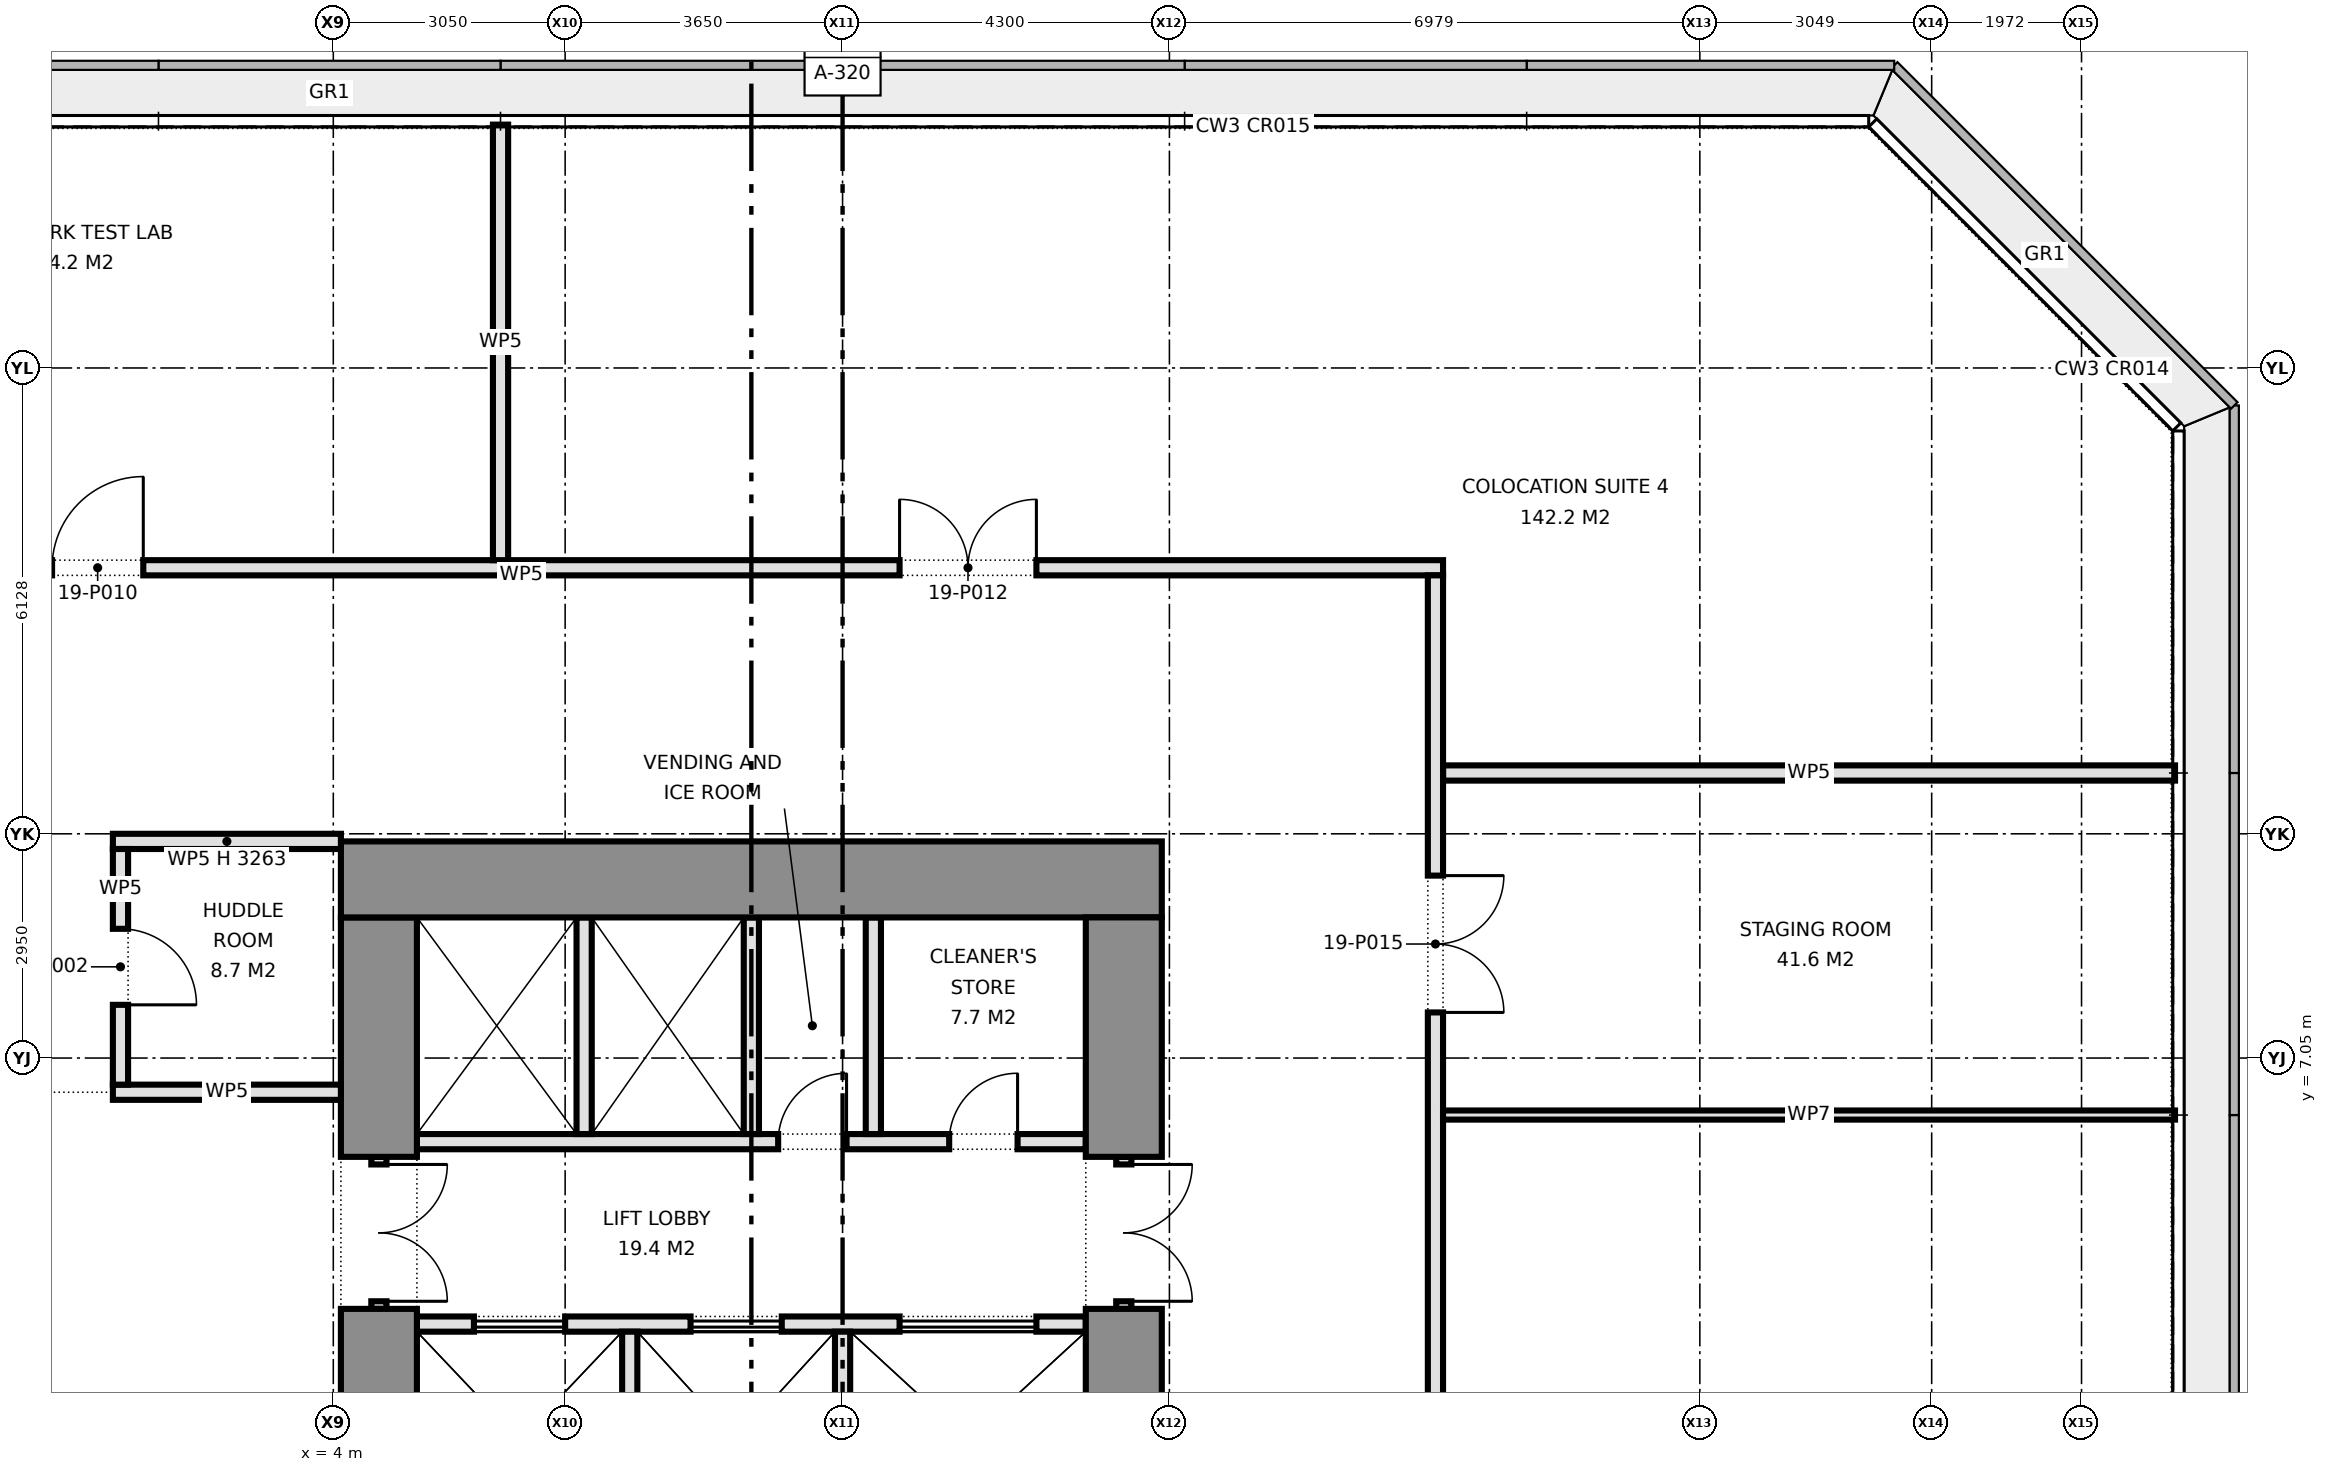
"""IFC4 building model, lengths in metres.
Left out: names, types, materials, properties, quantities, classifications, styles, units other than length and angle.
Written with IfcOpenShell. Run it as: python <this file> out.ifc"""

import sys

from ifc_helpers import new_model, si_unit, direction, frame, frame_2d, origin, place, context, subcontext, project, spatial, rectangle, extrude, element, fill, save


model = new_model("IFC4")
c1 = context("Model", 3, precision=1e-05, world=origin(), true_north=direction((0.0, 1.0)))
c2 = subcontext(c1, "Body", "Model", "MODEL_VIEW")
j1 = project(units=[si_unit("LENGTHUNIT", "METRE"), si_unit("PLANEANGLEUNIT", "RADIAN")], contexts=[c1])
p1 = place(None, origin())
s1 = spatial("IfcSite", under=j1, at=p1, CompositionType="ELEMENT")
p2 = place(p1, origin())
s2 = spatial("IfcBuilding", under=s1, at=p2, CompositionType="ELEMENT")
p3 = place(p2, frame((0.0, 0.0, 86.4)))
s3 = spatial("IfcBuildingStorey", under=s2, at=p3, CompositionType="ELEMENT", Elevation=86.4)
p4 = place(p3, frame((14.9, 9.4, 0.0), z_axis=(0.0, 0.0, 1.0), x_axis=(-1.0, 0.0, 0.0)))
e1 = element("IfcWall", 1, at=p4, inside=s3, PredefinedType="SHEAR", context=c2, shape_type="SweptSolid", body=[
    extrude(rectangle(XDim=10.8, YDim=1.0, at=frame_2d((5.4, 0.0))), origin(), (0.0, 0.0, 1.0), 4.2),
])
p5 = place(p3, frame((14.4, 8.9, 0.0), z_axis=(0.0, 0.0, 1.0), x_axis=(0.0, -1.0, 0.0)))
e2 = element("IfcWall", 2, at=p5, inside=s3, PredefinedType="SHEAR", context=c2, shape_type="SweptSolid", body=[
    extrude(rectangle(XDim=3.15, YDim=1.0, at=frame_2d((1.575, 0.0))), origin(), (0.0, 0.0, 1.0), 4.2),
])
p6 = place(p3, frame((14.4, 5.75, 0.0), z_axis=(0.0, 0.0, 1.0), x_axis=(0.0, -1.0, 0.0)))
e3 = element("IfcWall", 3, at=p6, inside=s3, PredefinedType="PARTITIONING", context=c2, shape_type="SweptSolid", body=[
    extrude(rectangle(XDim=2.0, YDim=0.2, at=frame_2d((1.0, 0.0))), origin(), (0.0, 0.0, 1.0), 2.4),
])
p7 = place(p6, frame((0.1, 0.0, 0.0)))
e4 = element("IfcOpeningElement", 4, at=p7, cuts=e3, PredefinedType="OPENING", context=c2, shape_type="SweptSolid", body=[
    extrude(rectangle(XDim=1.8, YDim=2.1, at=frame_2d((0.9, 1.05))), frame((0.0, 0.11, 0.0), z_axis=(0.0, -1.0, 0.0), x_axis=(1.0, 0.0, 0.0)), (0.0, 0.0, 1.0), 0.22),
])
p8 = place(p3, frame((14.4, 3.75, 0.0), z_axis=(0.0, 0.0, 1.0), x_axis=(0.0, -1.0, 0.0)))
e5 = element("IfcWall", 5, at=p8, inside=s3, PredefinedType="SHEAR", context=c2, shape_type="SweptSolid", body=[
    extrude(rectangle(XDim=6.13, YDim=1.0, at=frame_2d((3.065, 0.0))), origin(), (0.0, 0.0, 1.0), 4.2),
])
p9 = place(p3, frame((4.6, 8.9, 0.0), z_axis=(0.0, 0.0, 1.0), x_axis=(0.0, -1.0, 0.0)))
e6 = element("IfcWall", 6, at=p9, inside=s3, PredefinedType="SHEAR", context=c2, shape_type="SweptSolid", body=[
    extrude(rectangle(XDim=3.15, YDim=1.0, at=frame_2d((1.575, 0.0))), origin(), (0.0, 0.0, 1.0), 4.2),
])
p10 = place(p3, frame((4.6, 5.75, 0.0), z_axis=(0.0, 0.0, 1.0), x_axis=(0.0, -1.0, 0.0)))
e7 = element("IfcWall", 7, at=p10, inside=s3, PredefinedType="PARTITIONING", context=c2, shape_type="SweptSolid", body=[
    extrude(rectangle(XDim=2.0, YDim=0.2, at=frame_2d((1.0, 0.0))), origin(), (0.0, 0.0, 1.0), 2.4),
])
p11 = place(p10, frame((0.1, 0.0, 0.0)))
e8 = element("IfcOpeningElement", 8, at=p11, cuts=e7, PredefinedType="OPENING", context=c2, shape_type="SweptSolid", body=[
    extrude(rectangle(XDim=1.8, YDim=2.1, at=frame_2d((0.9, 1.05))), frame((0.0, 0.11, 0.0), z_axis=(0.0, -1.0, 0.0), x_axis=(1.0, 0.0, 0.0)), (0.0, 0.0, 1.0), 0.22),
])
p12 = place(p3, frame((4.6, 3.75, 0.0), z_axis=(0.0, 0.0, 1.0), x_axis=(0.0, -1.0, 0.0)))
e9 = element("IfcWall", 9, at=p12, inside=s3, PredefinedType="SHEAR", context=c2, shape_type="SweptSolid", body=[
    extrude(rectangle(XDim=4.0, YDim=1.0, at=frame_2d((2.0, 0.0))), origin(), (0.0, 0.0, 1.0), 4.2),
])
p13 = place(p3, frame((13.9, 5.95, 0.0), z_axis=(0.0, 0.0, 1.0), x_axis=(-1.0, 0.0, 0.0)))
e10 = element("IfcWall", 10, at=p13, inside=s3, PredefinedType="PARTITIONING", context=c2, shape_type="SweptSolid", body=[
    extrude(rectangle(XDim=8.8, YDim=0.2, at=frame_2d((4.4, 0.0))), origin(), (0.0, 0.0, 1.0), 4.2),
])
p14 = place(p13, frame((0.897, 0.0, 0.0)))
e11 = element("IfcOpeningElement", 11, at=p14, cuts=e10, PredefinedType="OPENING", context=c2, shape_type="SweptSolid", body=[
    extrude(rectangle(XDim=0.9, YDim=2.1, at=frame_2d((0.45, 1.05))), frame((0.0, 0.11, 0.0), z_axis=(0.0, -1.0, 0.0), x_axis=(1.0, 0.0, 0.0)), (0.0, 0.0, 1.0), 0.22),
])
p15 = place(p13, frame((3.147, 0.0, 0.0)))
e12 = element("IfcOpeningElement", 12, at=p15, cuts=e10, PredefinedType="OPENING", context=c2, shape_type="SweptSolid", body=[
    extrude(rectangle(XDim=0.9, YDim=2.1, at=frame_2d((0.45, 1.05))), frame((0.0, 0.11, 0.0), z_axis=(0.0, -1.0, 0.0), x_axis=(1.0, 0.0, 0.0)), (0.0, 0.0, 1.0), 0.22),
])
p16 = place(p3, frame((13.9, 3.55, 0.0), z_axis=(0.0, 0.0, 1.0), x_axis=(-1.0, 0.0, 0.0)))
e13 = element("IfcWall", 13, at=p16, inside=s3, PredefinedType="PARTITIONING", context=c2, shape_type="SweptSolid", body=[
    extrude(rectangle(XDim=8.8, YDim=0.2, at=frame_2d((4.4, 0.0))), origin(), (0.0, 0.0, 1.0), 4.2),
])
p17 = place(p16, frame((0.65, 0.0, 0.0)))
e14 = element("IfcOpeningElement", 14, at=p17, cuts=e13, PredefinedType="OPENING", context=c2, shape_type="SweptSolid", body=[
    extrude(rectangle(XDim=1.8, YDim=2.1, at=frame_2d((0.9, 1.05))), frame((0.0, 0.11, 0.0), z_axis=(0.0, -1.0, 0.0), x_axis=(1.0, 0.0, 0.0)), (0.0, 0.0, 1.0), 0.22),
])
p18 = place(p16, frame((4.0, 0.0, 0.0)))
e15 = element("IfcOpeningElement", 15, at=p18, cuts=e13, PredefinedType="OPENING", context=c2, shape_type="SweptSolid", body=[
    extrude(rectangle(XDim=1.2, YDim=2.1, at=frame_2d((0.6, 1.05))), frame((0.0, 0.11, 0.0), z_axis=(0.0, -1.0, 0.0), x_axis=(1.0, 0.0, 0.0)), (0.0, 0.0, 1.0), 0.22),
])
p19 = place(p16, frame((6.85, 0.0, 0.0)))
e16 = element("IfcOpeningElement", 16, at=p19, cuts=e13, PredefinedType="OPENING", context=c2, shape_type="SweptSolid", body=[
    extrude(rectangle(XDim=1.2, YDim=2.1, at=frame_2d((0.6, 1.05))), frame((0.0, 0.11, 0.0), z_axis=(0.0, -1.0, 0.0), x_axis=(1.0, 0.0, 0.0)), (0.0, 0.0, 1.0), 0.22),
])
for number, where, z_axis, x_axis in (
    (17, (9.5, 8.9, 0.0), (0.0, 0.0, 1.0), (0.0, -1.0, 0.0)),
    (18, (7.3, 8.9, 0.0), (0.0, 0.0, 1.0), (0.0, -1.0, 0.0)),
    (19, (11.105, 8.9, 0.0), (0.0, 0.0, 1.0), (0.0, -1.0, 0.0)),
    (20, (10.7, 3.45, 0.0), (0.0, 0.0, 1.0), (0.0, -1.0, 0.0)),
    (21, (7.9, 3.45, 0.0), (0.0, 0.0, 1.0), (0.0, -1.0, 0.0)),
):
    element("IfcWall", number, at=place(p3, frame(where, z_axis=z_axis, x_axis=x_axis)), inside=s3, PredefinedType="PARTITIONING", context=c2, shape_type="SweptSolid", body=[
        extrude(rectangle(XDim=2.85, YDim=0.2, at=frame_2d((1.425, 0.0))), origin(), (0.0, 0.0, 1.0), 4.2),
    ])
p20 = place(p3, frame((1.1, 6.6, 0.0), z_axis=(0.0, 0.0, 1.0), x_axis=(1.0, 0.0, 0.0)))
e22 = element("IfcWall", 22, at=p20, inside=s3, PredefinedType="PARTITIONING", context=c2, shape_type="SweptSolid", body=[
    extrude(rectangle(XDim=3.0, YDim=0.2, at=frame_2d((1.5, 0.0))), origin(), (0.0, 0.0, 1.0), 4.2),
])
p21 = place(p3, frame((1.1, 9.9, 0.0), z_axis=(0.0, 0.0, 1.0), x_axis=(1.0, 0.0, 0.0)))
e23 = element("IfcWall", 23, at=p21, inside=s3, PredefinedType="PARTITIONING", context=c2, shape_type="SweptSolid", body=[
    extrude(rectangle(XDim=3.0, YDim=0.2, at=frame_2d((1.5, 0.0))), origin(), (0.0, 0.0, 1.0), 3.263),
])
p22 = place(p3, frame((18.6, 10.8, 0.0), z_axis=(0.0, 0.0, 1.0), x_axis=(1.0, 0.0, 0.0)))
e24 = element("IfcWall", 24, at=p22, inside=s3, PredefinedType="PARTITIONING", context=c2, shape_type="SweptSolid", body=[
    extrude(rectangle(XDim=9.63, YDim=0.2, at=frame_2d((4.815, 0.0))), origin(), (0.0, 0.0, 1.0), 4.2),
])
p23 = place(p3, frame((-18.6, 13.5, 0.0), z_axis=(0.0, 0.0, 1.0), x_axis=(1.0, 0.0, 0.0)))
e25 = element("IfcWall", 25, at=p23, inside=s3, PredefinedType="PARTITIONING", context=c2, shape_type="SweptSolid", body=[
    extrude(rectangle(XDim=37.2, YDim=0.2, at=frame_2d((18.6, 0.0))), origin(), (0.0, 0.0, 1.0), 4.2),
])
p24 = place(p23, frame((5.1, 0.0, 0.0)))
e26 = element("IfcOpeningElement", 26, at=p24, cuts=e25, PredefinedType="OPENING", context=c2, shape_type="SweptSolid", body=[
    extrude(rectangle(XDim=1.2, YDim=2.1, at=frame_2d((0.6, 1.05))), frame((0.0, 0.11, 0.0), z_axis=(0.0, -1.0, 0.0), x_axis=(1.0, 0.0, 0.0)), (0.0, 0.0, 1.0), 0.22),
])
p25 = place(p23, frame((18.9, 0.0, 0.0)))
e27 = element("IfcOpeningElement", 27, at=p25, cuts=e25, PredefinedType="OPENING", context=c2, shape_type="SweptSolid", body=[
    extrude(rectangle(XDim=1.2, YDim=2.1, at=frame_2d((0.6, 1.05))), frame((0.0, 0.11, 0.0), z_axis=(0.0, -1.0, 0.0), x_axis=(1.0, 0.0, 0.0)), (0.0, 0.0, 1.0), 0.22),
])
p26 = place(p23, frame((12.15, 0.0, 0.0)))
e28 = element("IfcOpeningElement", 28, at=p26, cuts=e25, PredefinedType="OPENING", context=c2, shape_type="SweptSolid", body=[
    extrude(rectangle(XDim=1.2, YDim=2.1, at=frame_2d((0.6, 1.05))), frame((0.0, 0.11, 0.0), z_axis=(0.0, -1.0, 0.0), x_axis=(1.0, 0.0, 0.0)), (0.0, 0.0, 1.0), 0.22),
])
p27 = place(p23, frame((30.05, 0.0, 0.0)))
e29 = element("IfcOpeningElement", 29, at=p27, cuts=e25, PredefinedType="OPENING", context=c2, shape_type="SweptSolid", body=[
    extrude(rectangle(XDim=1.8, YDim=2.1, at=frame_2d((0.9, 1.05))), frame((0.0, 0.11, 0.0), z_axis=(0.0, -1.0, 0.0), x_axis=(1.0, 0.0, 0.0)), (0.0, 0.0, 1.0), 0.22),
])
p28 = place(p3, frame((18.5, -13.4, 0.0), z_axis=(0.0, 0.0, 1.0), x_axis=(0.0, 1.0, 0.0)))
e30 = element("IfcWall", 30, at=p28, inside=s3, PredefinedType="PARTITIONING", context=c2, shape_type="SweptSolid", body=[
    extrude(rectangle(XDim=26.8, YDim=0.2, at=frame_2d((13.4, 0.0))), origin(), (0.0, 0.0, 1.0), 4.2),
])
p29 = place(p28, frame((5.6, 0.0, 0.0)))
e31 = element("IfcOpeningElement", 31, at=p29, cuts=e30, PredefinedType="OPENING", context=c2, shape_type="SweptSolid", body=[
    extrude(rectangle(XDim=1.2, YDim=2.1, at=frame_2d((0.6, 1.05))), frame((0.0, 0.11, 0.0), z_axis=(0.0, -1.0, 0.0), x_axis=(1.0, 0.0, 0.0)), (0.0, 0.0, 1.0), 0.22),
])
p30 = place(p28, frame((14.6, 0.0, 0.0)))
e32 = element("IfcOpeningElement", 32, at=p30, cuts=e30, PredefinedType="OPENING", context=c2, shape_type="SweptSolid", body=[
    extrude(rectangle(XDim=1.2, YDim=2.1, at=frame_2d((0.6, 1.05))), frame((0.0, 0.11, 0.0), z_axis=(0.0, -1.0, 0.0), x_axis=(1.0, 0.0, 0.0)), (0.0, 0.0, 1.0), 0.22),
])
p31 = place(p28, frame((21.05, 0.0, 0.0)))
e33 = element("IfcOpeningElement", 33, at=p31, cuts=e30, PredefinedType="OPENING", context=c2, shape_type="SweptSolid", body=[
    extrude(rectangle(XDim=1.8, YDim=2.1, at=frame_2d((0.9, 1.05))), frame((0.0, 0.11, 0.0), z_axis=(0.0, -1.0, 0.0), x_axis=(1.0, 0.0, 0.0)), (0.0, 0.0, 1.0), 0.22),
])
p32 = place(p3, frame((6.2, 13.6, 0.0), z_axis=(0.0, 0.0, 1.0), x_axis=(0.0, 1.0, 0.0)))
e34 = element("IfcWall", 34, at=p32, inside=s3, PredefinedType="PARTITIONING", context=c2, shape_type="SweptSolid", body=[
    extrude(rectangle(XDim=5.73, YDim=0.2, at=frame_2d((2.865, 0.0))), origin(), (0.0, 0.0, 1.0), 4.2),
])
p33 = place(p3, frame((1.2, 6.7, 0.0), z_axis=(0.0, 0.0, 1.0), x_axis=(0.0, 1.0, 0.0)))
e35 = element("IfcWall", 35, at=p33, inside=s3, PredefinedType="PARTITIONING", context=c2, shape_type="SweptSolid", body=[
    extrude(rectangle(XDim=3.1, YDim=0.2, at=frame_2d((1.55, 0.0))), origin(), (0.0, 0.0, 1.0), 4.2),
])
p34 = place(p33, frame((1.05, 0.0, 0.0)))
e36 = element("IfcOpeningElement", 36, at=p34, cuts=e35, PredefinedType="OPENING", context=c2, shape_type="SweptSolid", body=[
    extrude(rectangle(XDim=1.0, YDim=2.1, at=frame_2d((0.5, 1.05))), frame((0.0, 0.11, 0.0), z_axis=(0.0, -1.0, 0.0), x_axis=(1.0, 0.0, 0.0)), (0.0, 0.0, 1.0), 0.22),
])
p35 = place(p3, frame((18.6, 6.3, 0.0), z_axis=(0.0, 0.0, 1.0), x_axis=(1.0, 0.0, 0.0)))
e37 = element("IfcWall", 37, at=p35, inside=s3, PredefinedType="PARTITIONING", context=c2, shape_type="SweptSolid", body=[
    extrude(rectangle(XDim=9.63, YDim=0.12, at=frame_2d((4.815, 0.0))), origin(), (0.0, 0.0, 1.0), 4.2),
])
p36 = place(p7, origin())
e38 = element("IfcDoor", 38, at=p36, inside=s3, OperationType="DOUBLE_DOOR_SINGLE_SWING", PredefinedType="DOOR", context=c2, shape_type="SweptSolid", body=[
    extrude(rectangle(XDim=1.8, YDim=2.1, at=frame_2d((0.9, 1.05))), frame((0.0, 0.025, 0.0), z_axis=(0.0, -1.0, 0.0), x_axis=(1.0, 0.0, 0.0)), (0.0, 0.0, 1.0), 0.05),
])
fill(e4, e38)
p37 = place(p11, origin())
e39 = element("IfcDoor", 39, at=p37, inside=s3, OperationType="DOUBLE_DOOR_SINGLE_SWING", PredefinedType="DOOR", context=c2, shape_type="SweptSolid", body=[
    extrude(rectangle(XDim=1.8, YDim=2.1, at=frame_2d((0.9, 1.05))), frame((0.0, 0.025, 0.0), z_axis=(0.0, -1.0, 0.0), x_axis=(1.0, 0.0, 0.0)), (0.0, 0.0, 1.0), 0.05),
])
fill(e8, e39)
p38 = place(p17, origin())
e40 = element("IfcDoor", 40, at=p38, inside=s3, OperationType="DOUBLE_DOOR_SLIDING", PredefinedType="DOOR", context=c2, shape_type="SweptSolid", body=[
    extrude(rectangle(XDim=1.8, YDim=2.1, at=frame_2d((0.9, 1.05))), frame((0.0, 0.025, 0.0), z_axis=(0.0, -1.0, 0.0), x_axis=(1.0, 0.0, 0.0)), (0.0, 0.0, 1.0), 0.05),
])
fill(e14, e40)
p39 = place(p18, origin())
e41 = element("IfcDoor", 41, at=p39, inside=s3, OperationType="DOUBLE_DOOR_SLIDING", PredefinedType="DOOR", context=c2, shape_type="SweptSolid", body=[
    extrude(rectangle(XDim=1.2, YDim=2.1, at=frame_2d((0.6, 1.05))), frame((0.0, 0.025, 0.0), z_axis=(0.0, -1.0, 0.0), x_axis=(1.0, 0.0, 0.0)), (0.0, 0.0, 1.0), 0.05),
])
fill(e15, e41)
p40 = place(p19, origin())
e42 = element("IfcDoor", 42, at=p40, inside=s3, OperationType="DOUBLE_DOOR_SLIDING", PredefinedType="DOOR", context=c2, shape_type="SweptSolid", body=[
    extrude(rectangle(XDim=1.2, YDim=2.1, at=frame_2d((0.6, 1.05))), frame((0.0, 0.025, 0.0), z_axis=(0.0, -1.0, 0.0), x_axis=(1.0, 0.0, 0.0)), (0.0, 0.0, 1.0), 0.05),
])
fill(e16, e42)
p41 = place(p14, frame((0.9, 0.0, 0.0), z_axis=(0.0, 0.0, 1.0), x_axis=(-1.0, 0.0, 0.0)))
e43 = element("IfcDoor", 43, at=p41, inside=s3, OperationType="SINGLE_SWING_RIGHT", PredefinedType="DOOR", context=c2, shape_type="SweptSolid", body=[
    extrude(rectangle(XDim=0.9, YDim=2.1, at=frame_2d((0.45, 1.05))), frame((0.0, 0.025, 0.0), z_axis=(0.0, -1.0, 0.0), x_axis=(1.0, 0.0, 0.0)), (0.0, 0.0, 1.0), 0.05),
])
fill(e11, e43)
p42 = place(p15, frame((0.9, 0.0, 0.0), z_axis=(0.0, 0.0, 1.0), x_axis=(-1.0, 0.0, 0.0)))
e44 = element("IfcDoor", 44, at=p42, inside=s3, OperationType="SINGLE_SWING_RIGHT", PredefinedType="DOOR", context=c2, shape_type="SweptSolid", body=[
    extrude(rectangle(XDim=0.9, YDim=2.1, at=frame_2d((0.45, 1.05))), frame((0.0, 0.025, 0.0), z_axis=(0.0, -1.0, 0.0), x_axis=(1.0, 0.0, 0.0)), (0.0, 0.0, 1.0), 0.05),
])
fill(e12, e44)
p43 = place(p34, frame((1.0, 0.0, 0.0), z_axis=(0.0, 0.0, 1.0), x_axis=(-1.0, 0.0, 0.0)))
e45 = element("IfcDoor", 45, at=p43, inside=s3, OperationType="SINGLE_SWING_RIGHT", PredefinedType="DOOR", context=c2, shape_type="SweptSolid", body=[
    extrude(rectangle(XDim=1.0, YDim=2.1, at=frame_2d((0.5, 1.05))), frame((0.0, 0.025, 0.0), z_axis=(0.0, -1.0, 0.0), x_axis=(1.0, 0.0, 0.0)), (0.0, 0.0, 1.0), 0.05),
])
fill(e36, e45)
p44 = place(p25, origin())
e46 = element("IfcDoor", 46, at=p44, inside=s3, OperationType="SINGLE_SWING_RIGHT", PredefinedType="DOOR", context=c2, shape_type="SweptSolid", body=[
    extrude(rectangle(XDim=1.2, YDim=2.1, at=frame_2d((0.6, 1.05))), frame((0.0, 0.025, 0.0), z_axis=(0.0, -1.0, 0.0), x_axis=(1.0, 0.0, 0.0)), (0.0, 0.0, 1.0), 0.05),
])
fill(e27, e46)
p45 = place(p27, origin())
e47 = element("IfcDoor", 47, at=p45, inside=s3, OperationType="DOUBLE_DOOR_SINGLE_SWING", PredefinedType="DOOR", context=c2, shape_type="SweptSolid", body=[
    extrude(rectangle(XDim=1.8, YDim=2.1, at=frame_2d((0.9, 1.05))), frame((0.0, 0.025, 0.0), z_axis=(0.0, -1.0, 0.0), x_axis=(1.0, 0.0, 0.0)), (0.0, 0.0, 1.0), 0.05),
])
fill(e29, e47)
p46 = place(p31, frame((1.8, 0.0, 0.0), z_axis=(0.0, 0.0, 1.0), x_axis=(-1.0, 0.0, 0.0)))
e48 = element("IfcDoor", 48, at=p46, inside=s3, OperationType="DOUBLE_DOOR_SINGLE_SWING", PredefinedType="DOOR", context=c2, shape_type="SweptSolid", body=[
    extrude(rectangle(XDim=1.8, YDim=2.1, at=frame_2d((0.9, 1.05))), frame((0.0, 0.025, 0.0), z_axis=(0.0, -1.0, 0.0), x_axis=(1.0, 0.0, 0.0)), (0.0, 0.0, 1.0), 0.05),
])
fill(e33, e48)
save(model, sys.argv[1])
